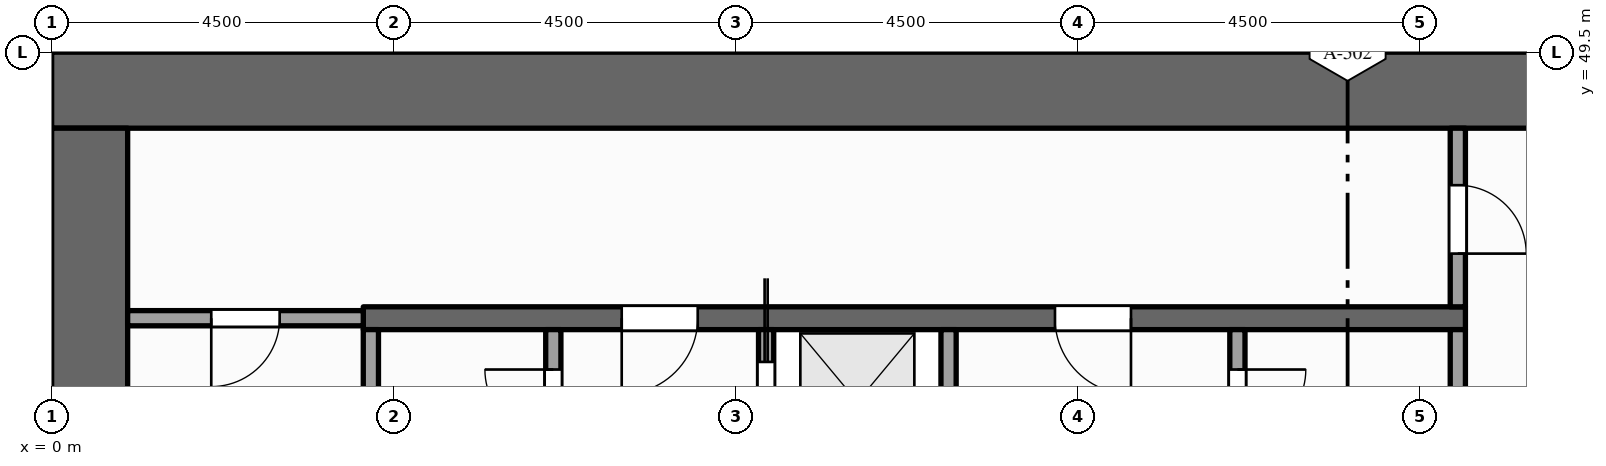
"""IFC4 building model, lengths in metres.
Left out: names, types, materials, properties, quantities, classifications, styles, units other than length and angle.
Written with IfcOpenShell. Run it as: python <this file> out.ifc"""

import sys

from ifc_helpers import new_model, si_unit, direction, frame, frame_2d, origin, place, context, subcontext, project, spatial, rectangle, extrude, element, fill, save


model = new_model("IFC4")
c1 = context("Model", 3, precision=1e-05, world=origin(), true_north=direction((0.0, 1.0)))
c2 = subcontext(c1, "Body", "Model", "MODEL_VIEW")
j1 = project(units=[si_unit("LENGTHUNIT", "METRE"), si_unit("PLANEANGLEUNIT", "RADIAN")], contexts=[c1])
p1 = place(None, origin())
s1 = spatial("IfcSite", under=j1, at=p1, CompositionType="ELEMENT")
p2 = place(p1, origin())
s2 = spatial("IfcBuilding", under=s1, at=p2, CompositionType="ELEMENT")
p3 = place(p2, frame((0.0, 0.0, 159.0)))
s3 = spatial("IfcBuildingStorey", under=s2, at=p3, CompositionType="ELEMENT", Elevation=159.0)
p4 = place(p3, frame((0.0, 49.0, -0.15), z_axis=(0.0, 0.0, 1.0), x_axis=(1.0, 0.0, 0.0)))
e1 = element("IfcWall", 1, at=p4, inside=s3, PredefinedType="SHEAR", context=c2, shape_type="SweptSolid", body=[
    extrude(rectangle(XDim=22.5, YDim=1.0, at=frame_2d((11.25, 0.0))), origin(), (0.0, 0.0, 1.0), 4.0),
])
p5 = place(p3, frame((0.5, 37.0, -0.15), z_axis=(0.0, 0.0, 1.0), x_axis=(0.0, 1.0, 0.0)))
e2 = element("IfcWall", 2, at=p5, inside=s3, PredefinedType="SHEAR", context=c2, shape_type="SweptSolid", body=[
    extrude(rectangle(XDim=11.5, YDim=1.0, at=frame_2d((5.75, 0.0))), origin(), (0.0, 0.0, 1.0), 4.0),
])
p6 = place(p3, frame((4.2, 43.525, 0.0), z_axis=(0.0, 0.0, 1.0), x_axis=(0.0, 1.0, 0.0)))
e3 = element("IfcWall", 3, at=p6, inside=s3, PredefinedType="PARTITIONING", context=c2, shape_type="SweptSolid", body=[
    extrude(rectangle(XDim=2.325, YDim=0.2, at=frame_2d((1.163, 0.0))), origin(), (0.0, 0.0, 1.0), 3.85),
])
p7 = place(p3, frame((6.6, 37.0, 0.0), z_axis=(0.0, 0.0, 1.0), x_axis=(0.0, 1.0, 0.0)))
e4 = element("IfcWall", 4, at=p7, inside=s3, PredefinedType="PARTITIONING", context=c2, shape_type="SweptSolid", body=[
    extrude(rectangle(XDim=8.85, YDim=0.2, at=frame_2d((4.425, 0.0))), origin(), (0.0, 0.0, 1.0), 3.85),
])
p8 = place(p7, frame((0.7, 0.0, 0.0)))
e5 = element("IfcOpeningElement", 5, at=p8, cuts=e4, PredefinedType="OPENING", context=c2, shape_type="SweptSolid", body=[
    extrude(rectangle(XDim=0.9, YDim=2.1, at=frame_2d((0.45, 1.05))), frame((0.0, 0.11, 0.0), z_axis=(0.0, -1.0, 0.0), x_axis=(1.0, 0.0, 0.0)), (0.0, 0.0, 1.0), 0.22),
])
p9 = place(p7, frame((4.15, 0.0, 0.0)))
e6 = element("IfcOpeningElement", 6, at=p9, cuts=e4, PredefinedType="OPENING", context=c2, shape_type="SweptSolid", body=[
    extrude(rectangle(XDim=0.9, YDim=2.1, at=frame_2d((0.45, 1.05))), frame((0.0, 0.11, 0.0), z_axis=(0.0, -1.0, 0.0), x_axis=(1.0, 0.0, 0.0)), (0.0, 0.0, 1.0), 0.22),
])
p10 = place(p7, frame((7.425, 0.0, 0.0)))
e7 = element("IfcOpeningElement", 7, at=p10, cuts=e4, PredefinedType="OPENING", context=c2, shape_type="SweptSolid", body=[
    extrude(rectangle(XDim=0.9, YDim=2.1, at=frame_2d((0.45, 1.05))), frame((0.0, 0.11, 0.0), z_axis=(0.0, -1.0, 0.0), x_axis=(1.0, 0.0, 0.0)), (0.0, 0.0, 1.0), 0.22),
])
p11 = place(p3, frame((9.4, 37.0, 0.0), z_axis=(0.0, 0.0, 1.0), x_axis=(0.0, 1.0, 0.0)))
e8 = element("IfcWall", 8, at=p11, inside=s3, PredefinedType="SOLIDWALL", context=c2, shape_type="SweptSolid", body=[
    extrude(rectangle(XDim=8.85, YDim=0.2, at=frame_2d((4.425, 0.0))), origin(), (0.0, 0.0, 1.0), 3.85),
])
p12 = place(p11, frame((0.6, 0.0, 0.012)))
e9 = element("IfcOpeningElement", 9, at=p12, cuts=e8, PredefinedType="OPENING", context=c2, shape_type="SweptSolid", body=[
    extrude(rectangle(XDim=1.1, YDim=2.1, at=frame_2d((0.55, 1.05))), frame((0.0, 0.11, 0.0), z_axis=(0.0, -1.0, 0.0), x_axis=(1.0, 0.0, 0.0)), (0.0, 0.0, 1.0), 0.22),
])
p13 = place(p11, frame((2.95, 0.0, 0.012)))
e10 = element("IfcOpeningElement", 10, at=p13, cuts=e8, PredefinedType="OPENING", context=c2, shape_type="SweptSolid", body=[
    extrude(rectangle(XDim=1.1, YDim=2.1, at=frame_2d((0.55, 1.05))), frame((0.0, 0.11, 0.0), z_axis=(0.0, -1.0, 0.0), x_axis=(1.0, 0.0, 0.0)), (0.0, 0.0, 1.0), 0.22),
])
p14 = place(p11, frame((5.15, 0.0, 0.012)))
e11 = element("IfcOpeningElement", 11, at=p14, cuts=e8, PredefinedType="OPENING", context=c2, shape_type="SweptSolid", body=[
    extrude(rectangle(XDim=1.1, YDim=2.1, at=frame_2d((0.55, 1.05))), frame((0.0, 0.11, 0.0), z_axis=(0.0, -1.0, 0.0), x_axis=(1.0, 0.0, 0.0)), (0.0, 0.0, 1.0), 0.22),
])
p15 = place(p11, frame((7.325, 0.0, 0.012)))
e12 = element("IfcOpeningElement", 12, at=p15, cuts=e8, PredefinedType="OPENING", context=c2, shape_type="SweptSolid", body=[
    extrude(rectangle(XDim=1.1, YDim=2.1, at=frame_2d((0.55, 1.05))), frame((0.0, 0.11, 0.0), z_axis=(0.0, -1.0, 0.0), x_axis=(1.0, 0.0, 0.0)), (0.0, 0.0, 1.0), 0.22),
])
p16 = place(p3, frame((11.8, 37.0, 0.0), z_axis=(0.0, 0.0, 1.0), x_axis=(0.0, 1.0, 0.0)))
e13 = element("IfcWall", 13, at=p16, inside=s3, PredefinedType="SOLIDWALL", context=c2, shape_type="SweptSolid", body=[
    extrude(rectangle(XDim=8.85, YDim=0.2, at=frame_2d((4.425, 0.0))), origin(), (0.0, 0.0, 1.0), 3.85),
])
p17 = place(p3, frame((15.6, 43.9, 0.0), z_axis=(0.0, 0.0, 1.0), x_axis=(0.0, 1.0, 0.0)))
e14 = element("IfcWall", 14, at=p17, inside=s3, PredefinedType="PARTITIONING", context=c2, shape_type="SweptSolid", body=[
    extrude(rectangle(XDim=1.95, YDim=0.2, at=frame_2d((0.975, 0.0))), origin(), (0.0, 0.0, 1.0), 3.85),
])
p18 = place(p17, frame((0.525, 0.0, 0.0)))
e15 = element("IfcOpeningElement", 15, at=p18, cuts=e14, PredefinedType="OPENING", context=c2, shape_type="SweptSolid", body=[
    extrude(rectangle(XDim=0.9, YDim=2.1, at=frame_2d((0.45, 1.05))), frame((0.0, 0.11, 0.0), z_axis=(0.0, -1.0, 0.0), x_axis=(1.0, 0.0, 0.0)), (0.0, 0.0, 1.0), 0.22),
])
p19 = place(p3, frame((18.5, 43.9, 0.0), z_axis=(0.0, 0.0, 1.0), x_axis=(0.0, 1.0, 0.0)))
e16 = element("IfcWall", 16, at=p19, inside=s3, PredefinedType="PARTITIONING", context=c2, shape_type="SweptSolid", body=[
    extrude(rectangle(XDim=1.95, YDim=0.2, at=frame_2d((0.975, 0.0))), origin(), (0.0, 0.0, 1.0), 3.85),
])
p20 = place(p3, frame((18.5, 46.15, 0.0), z_axis=(0.0, 0.0, 1.0), x_axis=(0.0, 1.0, 0.0)))
e17 = element("IfcWall", 17, at=p20, inside=s3, PredefinedType="PARTITIONING", context=c2, shape_type="SweptSolid", body=[
    extrude(rectangle(XDim=2.35, YDim=0.2, at=frame_2d((1.175, 0.0))), origin(), (0.0, 0.0, 1.0), 3.85),
])
p21 = place(p20, frame((0.7, 0.0, 0.0)))
e18 = element("IfcOpeningElement", 18, at=p21, cuts=e17, PredefinedType="OPENING", context=c2, shape_type="SweptSolid", body=[
    extrude(rectangle(XDim=0.9, YDim=2.1, at=frame_2d((0.45, 1.05))), frame((0.0, 0.11, 0.0), z_axis=(0.0, -1.0, 0.0), x_axis=(1.0, 0.0, 0.0)), (0.0, 0.0, 1.0), 0.22),
])
p22 = place(p3, frame((1.0, 46.0, 0.0), z_axis=(0.0, 0.0, 1.0), x_axis=(1.0, 0.0, 0.0)))
e19 = element("IfcWall", 19, at=p22, inside=s3, PredefinedType="PARTITIONING", context=c2, shape_type="SweptSolid", body=[
    extrude(rectangle(XDim=3.1, YDim=0.2, at=frame_2d((1.55, 0.0))), origin(), (0.0, 0.0, 1.0), 3.85),
])
p23 = place(p22, frame((1.1, 0.0, 0.0)))
e20 = element("IfcOpeningElement", 20, at=p23, cuts=e19, PredefinedType="OPENING", context=c2, shape_type="SweptSolid", body=[
    extrude(rectangle(XDim=0.9, YDim=2.1, at=frame_2d((0.45, 1.05))), frame((0.0, 0.11, 0.0), z_axis=(0.0, -1.0, 0.0), x_axis=(1.0, 0.0, 0.0)), (0.0, 0.0, 1.0), 0.22),
])
p24 = place(p3, frame((4.1, 46.0, 0.0), z_axis=(0.0, 0.0, 1.0), x_axis=(1.0, 0.0, 0.0)))
e21 = element("IfcWall", 21, at=p24, inside=s3, PredefinedType="SHEAR", context=c2, shape_type="SweptSolid", body=[
    extrude(rectangle(XDim=14.5, YDim=0.3, at=frame_2d((7.25, 0.0))), origin(), (0.0, 0.0, 1.0), 3.85),
])
p25 = place(p24, frame((3.4, 0.0, 0.0)))
e22 = element("IfcOpeningElement", 22, at=p25, cuts=e21, PredefinedType="OPENING", context=c2, shape_type="SweptSolid", body=[
    extrude(rectangle(XDim=1.0, YDim=2.1, at=frame_2d((0.5, 1.05))), frame((0.0, 0.16, 0.0), z_axis=(0.0, -1.0, 0.0), x_axis=(1.0, 0.0, 0.0)), (0.0, 0.0, 1.0), 0.32),
])
p26 = place(p24, frame((9.1, 0.0, 0.0)))
e23 = element("IfcOpeningElement", 23, at=p26, cuts=e21, PredefinedType="OPENING", context=c2, shape_type="SweptSolid", body=[
    extrude(rectangle(XDim=1.0, YDim=2.1, at=frame_2d((0.5, 1.05))), frame((0.0, 0.16, 0.0), z_axis=(0.0, -1.0, 0.0), x_axis=(1.0, 0.0, 0.0)), (0.0, 0.0, 1.0), 0.32),
])
p27 = place(p15, origin())
e24 = element("IfcDoor", 24, at=p27, inside=s3, OperationType="SLIDING_TO_RIGHT", PredefinedType="DOOR", context=c2, shape_type="SweptSolid", body=[
    extrude(rectangle(XDim=1.1, YDim=2.1, at=frame_2d((0.55, 1.05))), frame((0.0, 0.025, 0.0), z_axis=(0.0, -1.0, 0.0), x_axis=(1.0, 0.0, 0.0)), (0.0, 0.0, 1.0), 0.05),
])
fill(e12, e24)
p28 = place(p25, origin())
e25 = element("IfcDoor", 25, at=p28, inside=s3, OperationType="SINGLE_SWING_LEFT", PredefinedType="DOOR", context=c2, shape_type="SweptSolid", body=[
    extrude(rectangle(XDim=1.0, YDim=2.1, at=frame_2d((0.5, 1.05))), frame((0.0, 0.025, 0.0), z_axis=(0.0, -1.0, 0.0), x_axis=(1.0, 0.0, 0.0)), (0.0, 0.0, 1.0), 0.05),
])
fill(e22, e25)
p29 = place(p26, origin())
e26 = element("IfcDoor", 26, at=p29, inside=s3, OperationType="SINGLE_SWING_RIGHT", PredefinedType="DOOR", context=c2, shape_type="SweptSolid", body=[
    extrude(rectangle(XDim=1.0, YDim=2.1, at=frame_2d((0.5, 1.05))), frame((0.0, 0.025, 0.0), z_axis=(0.0, -1.0, 0.0), x_axis=(1.0, 0.0, 0.0)), (0.0, 0.0, 1.0), 0.05),
])
fill(e23, e26)
p30 = place(p23, origin())
e27 = element("IfcDoor", 27, at=p30, inside=s3, OperationType="SINGLE_SWING_LEFT", PredefinedType="DOOR", context=c2, shape_type="SweptSolid", body=[
    extrude(rectangle(XDim=0.9, YDim=2.1, at=frame_2d((0.45, 1.05))), frame((0.0, 0.025, 0.0), z_axis=(0.0, -1.0, 0.0), x_axis=(1.0, 0.0, 0.0)), (0.0, 0.0, 1.0), 0.05),
])
fill(e20, e27)
p31 = place(p21, origin())
e28 = element("IfcDoor", 28, at=p31, inside=s3, OperationType="SINGLE_SWING_LEFT", PredefinedType="DOOR", context=c2, shape_type="SweptSolid", body=[
    extrude(rectangle(XDim=0.9, YDim=2.1, at=frame_2d((0.45, 1.05))), frame((0.0, 0.025, 0.0), z_axis=(0.0, -1.0, 0.0), x_axis=(1.0, 0.0, 0.0)), (0.0, 0.0, 1.0), 0.05),
])
fill(e18, e28)
p32 = place(p10, origin())
e29 = element("IfcDoor", 29, at=p32, inside=s3, OperationType="SINGLE_SWING_RIGHT", PredefinedType="DOOR", context=c2, shape_type="SweptSolid", body=[
    extrude(rectangle(XDim=0.9, YDim=2.1, at=frame_2d((0.45, 1.05))), frame((0.0, 0.025, 0.0), z_axis=(0.0, -1.0, 0.0), x_axis=(1.0, 0.0, 0.0)), (0.0, 0.0, 1.0), 0.05),
])
fill(e7, e29)
p33 = place(p18, origin())
e30 = element("IfcDoor", 30, at=p33, inside=s3, OperationType="SINGLE_SWING_RIGHT", PredefinedType="DOOR", context=c2, shape_type="SweptSolid", body=[
    extrude(rectangle(XDim=0.9, YDim=2.1, at=frame_2d((0.45, 1.05))), frame((0.0, 0.025, 0.0), z_axis=(0.0, -1.0, 0.0), x_axis=(1.0, 0.0, 0.0)), (0.0, 0.0, 1.0), 0.05),
])
fill(e15, e30)
save(model, sys.argv[1])
